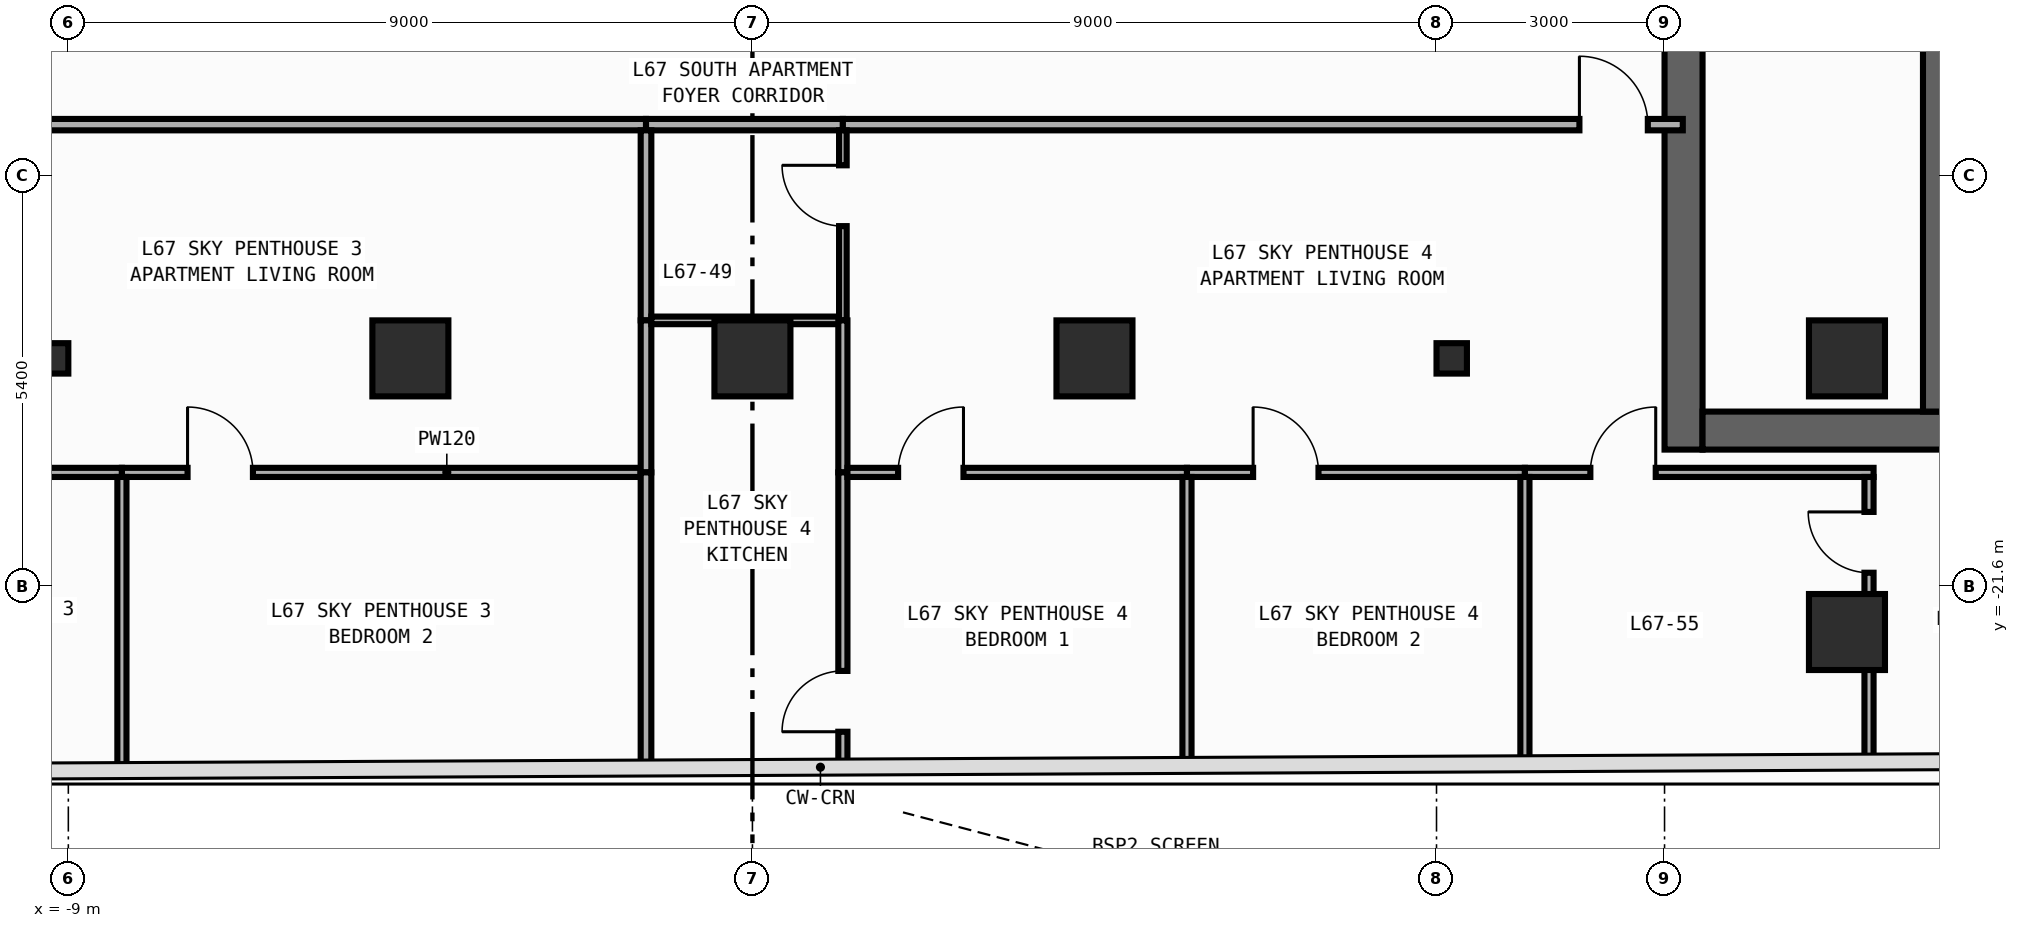
"""IFC4 building model, lengths in metres.
Left out: names, types, materials, properties, quantities, classifications, styles, units other than length and angle.
Written with IfcOpenShell. Run it as: python <this file> out.ifc"""

import sys

from ifc_helpers import new_model, si_unit, direction, frame, frame_2d, origin, origin_2d, place, context, subcontext, project, spatial, rectangle, circle, i_section, extrude, element, fill, save


model = new_model("IFC4")
c1 = context("Model", 3, precision=1e-05, world=origin(), true_north=direction((0.0, 1.0)))
c2 = subcontext(c1, "Body", "Model", "MODEL_VIEW")
j1 = project(units=[si_unit("LENGTHUNIT", "METRE"), si_unit("PLANEANGLEUNIT", "RADIAN")], contexts=[c1])
p1 = place(None, origin())
s1 = spatial("IfcSite", under=j1, at=p1, CompositionType="ELEMENT")
p2 = place(p1, origin())
s2 = spatial("IfcBuilding", under=s1, at=p2, CompositionType="ELEMENT")
p3 = place(p2, frame((0.0, 0.0, 281.4)))
s3 = spatial("IfcBuildingStorey", under=s2, at=p3, CompositionType="ELEMENT", Elevation=281.4)
p4 = place(p3, frame((12.25, -19.8, 0.0), z_axis=(0.0, 0.0, 1.0), x_axis=(0.0, 1.0, 0.0)))
e1 = element("IfcWall", 1, at=p4, inside=s3, PredefinedType="SHEAR", context=c2, shape_type="SweptSolid", body=[
    extrude(rectangle(XDim=27.0, YDim=0.5, at=frame_2d((13.5, 0.0))), origin(), (0.0, 0.0, 1.0), 3.54),
])
p5 = place(p4, frame((23.05, 0.0, 0.0)))
e2 = element("IfcOpeningElement", 2, at=p5, cuts=e1, PredefinedType="OPENING", context=c2, shape_type="SweptSolid", body=[
    extrude(rectangle(XDim=1.1, YDim=2.2, at=frame_2d((0.55, 1.1))), frame((0.0, 0.26, 0.0), z_axis=(0.0, -1.0, 0.0), x_axis=(1.0, 0.0, 0.0)), (0.0, 0.0, 1.0), 0.52),
])
p6 = place(p4, frame((19.85, 0.0, 0.0)))
e3 = element("IfcOpeningElement", 3, at=p6, cuts=e1, PredefinedType="OPENING", context=c2, shape_type="SweptSolid", body=[
    extrude(rectangle(XDim=1.1, YDim=2.2, at=frame_2d((0.55, 1.1))), frame((0.0, 0.26, 0.0), z_axis=(0.0, -1.0, 0.0), x_axis=(1.0, 0.0, 0.0)), (0.0, 0.0, 1.0), 0.52),
])
p7 = place(p4, frame((16.65, 0.0, 0.0)))
e4 = element("IfcOpeningElement", 4, at=p7, cuts=e1, PredefinedType="OPENING", context=c2, shape_type="SweptSolid", body=[
    extrude(rectangle(XDim=1.1, YDim=2.2, at=frame_2d((0.55, 1.1))), frame((0.0, 0.26, 0.0), z_axis=(0.0, -1.0, 0.0), x_axis=(1.0, 0.0, 0.0)), (0.0, 0.0, 1.0), 0.52),
])
p8 = place(p4, frame((10.175, 0.0, 0.0)))
e5 = element("IfcOpeningElement", 5, at=p8, cuts=e1, PredefinedType="OPENING", context=c2, shape_type="SweptSolid", body=[
    extrude(rectangle(XDim=0.85, YDim=2.1, at=frame_2d((0.425, 1.05))), frame((0.0, 0.26, 0.0), z_axis=(0.0, -1.0, 0.0), x_axis=(1.0, 0.0, 0.0)), (0.0, 0.0, 1.0), 0.52),
])
p9 = place(p4, frame((12.725, 0.0, 0.0)))
e6 = element("IfcOpeningElement", 6, at=p9, cuts=e1, PredefinedType="OPENING", context=c2, shape_type="SweptSolid", body=[
    extrude(rectangle(XDim=1.15, YDim=2.2, at=frame_2d((0.575, 1.1))), frame((0.0, 0.26, 0.0), z_axis=(0.0, -1.0, 0.0), x_axis=(1.0, 0.0, 0.0)), (0.0, 0.0, 1.0), 0.52),
])
p10 = place(p4, frame((25.125, 0.0, 0.0)))
e7 = element("IfcOpeningElement", 7, at=p10, cuts=e1, PredefinedType="OPENING", context=c2, shape_type="SweptSolid", body=[
    extrude(rectangle(XDim=0.85, YDim=2.1, at=frame_2d((0.425, 1.05))), frame((0.0, 0.26, 0.0), z_axis=(0.0, -1.0, 0.0), x_axis=(1.0, 0.0, 0.0)), (0.0, 0.0, 1.0), 0.52),
])
p11 = place(p3, frame((12.5, -19.55, 0.0), z_axis=(0.0, 0.0, 1.0), x_axis=(1.0, 0.0, 0.0)))
e8 = element("IfcWall", 8, at=p11, inside=s3, PredefinedType="SHEAR", context=c2, shape_type="SweptSolid", body=[
    extrude(rectangle(XDim=7.4, YDim=0.5, at=frame_2d((3.7, 0.0))), origin(), (0.0, 0.0, 1.0), 3.54),
])
p12 = place(p3, frame((15.55, -19.3, 0.0), z_axis=(0.0, 0.0, 1.0), x_axis=(0.0, 1.0, 0.0)))
e9 = element("IfcWall", 9, at=p12, inside=s3, PredefinedType="SHEAR", context=c2, shape_type="SweptSolid", body=[
    extrude(rectangle(XDim=26.0, YDim=0.3, at=frame_2d((13.0, 0.0))), origin(), (0.0, 0.0, 1.0), 3.54),
])
p13 = place(p12, frame((12.225, 0.0, 0.0)))
e10 = element("IfcOpeningElement", 10, at=p13, cuts=e9, PredefinedType="OPENING", context=c2, shape_type="SweptSolid", body=[
    extrude(rectangle(XDim=1.15, YDim=2.2, at=frame_2d((0.575, 1.1))), frame((0.0, 0.16, 0.0), z_axis=(0.0, -1.0, 0.0), x_axis=(1.0, 0.0, 0.0)), (0.0, 0.0, 1.0), 0.32),
])
p14 = place(p12, frame((24.625, 0.0, 0.0)))
e11 = element("IfcOpeningElement", 11, at=p14, cuts=e9, PredefinedType="OPENING", context=c2, shape_type="SweptSolid", body=[
    extrude(rectangle(XDim=0.85, YDim=2.1, at=frame_2d((0.425, 1.05))), frame((0.0, 0.16, 0.0), z_axis=(0.0, -1.0, 0.0), x_axis=(1.0, 0.0, 0.0)), (0.0, 0.0, 1.0), 0.32),
])
for number, where, z_axis, x_axis in (
    (12, (-9.2, -18.6, 0.0), (0.0, 0.0, 1.0), (1.0, 0.0, 0.0)),
    (13, (9.2, -18.6, 0.0), (0.0, 0.0, 1.0), (1.0, 0.0, 0.0)),
):
    element("IfcColumn", number, at=place(p3, frame(where, z_axis=z_axis, x_axis=x_axis)), inside=s3, PredefinedType="COLUMN", context=c2, shape_type="SweptSolid", body=[
        extrude(i_section(OverallWidth=0.4, OverallDepth=0.4, WebThickness=0.013, FlangeThickness=0.021, FilletRadius=0.022, at=origin_2d()), origin(), (0.0, 0.0, 1.0), 3.8),
    ])
for number, where, z_axis, x_axis in (
    (14, (14.4, -18.6, 0.0), (0.0, 0.0, 1.0), (1.0, 0.0, 0.0)),
    (15, (-4.5, -18.6, 0.0), (0.0, 0.0, 1.0), (1.0, 0.0, 0.0)),
    (16, (0.0, -18.6, 0.0), (0.0, 0.0, 1.0), (1.0, 0.0, 0.0)),
    (17, (4.5, -18.6, 0.0), (0.0, 0.0, 1.0), (1.0, 0.0, 0.0)),
    (18, (14.4, -22.2, 0.0), (0.0, 0.0, 1.0), (1.0, 0.0, 0.0)),
):
    element("IfcColumn", number, at=place(p3, frame(where, z_axis=z_axis, x_axis=x_axis)), inside=s3, PredefinedType="COLUMN", context=c2, shape_type="SweptSolid", body=[
        extrude(circle(Radius=0.5, at=origin_2d()), origin(), (0.0, 0.0, 1.0), 3.8),
    ])
p15 = place(p3, frame((-15.11, -15.525, 0.0), z_axis=(0.0, 0.0, 1.0), x_axis=(1.0, 0.0, 0.0)))
e19 = element("IfcWall", 19, at=p15, inside=s3, PredefinedType="PARTITIONING", context=c2, shape_type="SweptSolid", body=[
    extrude(rectangle(XDim=13.71, YDim=0.15, at=frame_2d((6.855, 0.0))), origin(), (0.0, 0.0, 1.0), 3.54),
])
p16 = place(p15, frame((3.08, 0.0, 0.0)))
e20 = element("IfcOpeningElement", 20, at=p16, cuts=e19, PredefinedType="OPENING", context=c2, shape_type="SweptSolid", body=[
    extrude(rectangle(XDim=0.9, YDim=2.15, at=frame_2d((0.45, 1.075))), frame((0.0, 0.085, 0.0), z_axis=(0.0, -1.0, 0.0), x_axis=(1.0, 0.0, 0.0)), (0.0, 0.0, 1.0), 0.17),
])
p17 = place(p3, frame((-1.4, -15.525, 0.0), z_axis=(0.0, 0.0, 1.0), x_axis=(1.0, 0.0, 0.0)))
e21 = element("IfcWall", 21, at=p17, inside=s3, PredefinedType="PARTITIONING", context=c2, shape_type="SweptSolid", body=[
    extrude(rectangle(XDim=2.59, YDim=0.15, at=frame_2d((1.295, 0.0))), origin(), (0.0, 0.0, 1.0), 3.54),
])
p18 = place(p3, frame((1.19, -15.525, 0.0), z_axis=(0.0, 0.0, 1.0), x_axis=(1.0, 0.0, 0.0)))
e22 = element("IfcWall", 22, at=p18, inside=s3, PredefinedType="PARTITIONING", context=c2, shape_type="SweptSolid", body=[
    extrude(rectangle(XDim=11.05, YDim=0.15, at=frame_2d((5.525, 0.0))), origin(), (0.0, 0.0, 1.0), 3.54),
])
p19 = place(p18, frame((9.69, 0.0, 0.0)))
e23 = element("IfcOpeningElement", 23, at=p19, cuts=e22, PredefinedType="OPENING", context=c2, shape_type="SweptSolid", body=[
    extrude(rectangle(XDim=0.9, YDim=2.15, at=frame_2d((0.45, 1.075))), frame((0.0, 0.085, 0.0), z_axis=(0.0, -1.0, 0.0), x_axis=(1.0, 0.0, 0.0)), (0.0, 0.0, 1.0), 0.17),
])
p20 = place(p3, frame((-15.05, -20.1, 0.0), z_axis=(0.0, 0.0, 1.0), x_axis=(1.0, 0.0, 0.0)))
e24 = element("IfcWall", 24, at=p20, inside=s3, PredefinedType="PARTITIONING", context=c2, shape_type="SweptSolid", body=[
    extrude(rectangle(XDim=6.755, YDim=0.12, at=frame_2d((3.377, 0.0))), origin(), (0.0, 0.0, 1.0), 3.54),
])
p21 = place(p20, frame((2.948, 0.0, 0.0)))
e25 = element("IfcOpeningElement", 25, at=p21, cuts=e24, PredefinedType="OPENING", context=c2, shape_type="SweptSolid", body=[
    extrude(rectangle(XDim=0.86, YDim=2.15, at=frame_2d((0.43, 1.075))), frame((0.0, 0.07, 0.0), z_axis=(0.0, -1.0, 0.0), x_axis=(1.0, 0.0, 0.0)), (0.0, 0.0, 1.0), 0.14),
])
p22 = place(p3, frame((-8.295, -20.1, 0.0), z_axis=(0.0, 0.0, 1.0), x_axis=(1.0, 0.0, 0.0)))
e26 = element("IfcWall", 26, at=p22, inside=s3, PredefinedType="PARTITIONING", context=c2, shape_type="SweptSolid", body=[
    extrude(rectangle(XDim=6.825, YDim=0.12, at=frame_2d((3.413, 0.0))), origin(), (0.0, 0.0, 1.0), 3.54),
])
p23 = place(p22, frame((0.864, 0.0, 0.0)))
e27 = element("IfcOpeningElement", 27, at=p23, cuts=e26, PredefinedType="OPENING", context=c2, shape_type="SweptSolid", body=[
    extrude(rectangle(XDim=0.86, YDim=2.15, at=frame_2d((0.43, 1.075))), frame((0.0, 0.07, 0.0), z_axis=(0.0, -1.0, 0.0), x_axis=(1.0, 0.0, 0.0)), (0.0, 0.0, 1.0), 0.14),
])
p24 = place(p3, frame((-1.4, -18.1, 0.0), z_axis=(0.0, 0.0, 1.0), x_axis=(0.0, 1.0, 0.0)))
e28 = element("IfcWall", 28, at=p24, inside=s3, PredefinedType="PARTITIONING", context=c2, shape_type="SweptSolid", body=[
    extrude(rectangle(XDim=2.5, YDim=0.14, at=frame_2d((1.25, 0.0))), origin(), (0.0, 0.0, 1.0), 3.54),
])
p25 = place(p3, frame((-1.4, -20.1, 0.0), z_axis=(0.0, 0.0, 1.0), x_axis=(0.0, 1.0, 0.0)))
e29 = element("IfcWall", 29, at=p25, inside=s3, PredefinedType="PARTITIONING", context=c2, shape_type="SweptSolid", body=[
    extrude(rectangle(XDim=2.0, YDim=0.14, at=frame_2d((1.0, 0.0))), origin(), (0.0, 0.0, 1.0), 3.54),
])
p26 = place(p3, frame((-8.295, -24.018, 0.0), z_axis=(0.0, 0.0, 1.0), x_axis=(0.0, 1.0, 0.0)))
e30 = element("IfcWall", 30, at=p26, inside=s3, PredefinedType="PARTITIONING", context=c2, shape_type="SweptSolid", body=[
    extrude(rectangle(XDim=3.858, YDim=0.12, at=frame_2d((1.929, 0.0))), origin(), (0.0, 0.0, 1.0), 3.54),
])
p27 = place(p3, frame((-1.4, -23.984, 0.0), z_axis=(0.0, 0.0, 1.0), x_axis=(0.0, 1.0, 0.0)))
e31 = element("IfcWall", 31, at=p27, inside=s3, PredefinedType="PARTITIONING", context=c2, shape_type="SweptSolid", body=[
    extrude(rectangle(XDim=3.884, YDim=0.14, at=frame_2d((1.942, 0.0))), origin(), (0.0, 0.0, 1.0), 3.54),
])
p28 = place(p3, frame((-1.33, -18.1, 0.0), z_axis=(0.0, 0.0, 1.0), x_axis=(1.0, 0.0, 0.0)))
e32 = element("IfcWall", 32, at=p28, inside=s3, PredefinedType="PARTITIONING", context=c2, shape_type="SweptSolid", body=[
    extrude(rectangle(XDim=2.47, YDim=0.1, at=frame_2d((1.235, 0.0))), origin(), (0.0, 0.0, 1.0), 3.54),
])
p29 = place(p3, frame((1.19, -18.1, 0.0), z_axis=(0.0, 0.0, 1.0), x_axis=(0.0, 1.0, 0.0)))
e33 = element("IfcWall", 33, at=p29, inside=s3, PredefinedType="PARTITIONING", context=c2, shape_type="SweptSolid", body=[
    extrude(rectangle(XDim=2.5, YDim=0.1, at=frame_2d((1.25, 0.0))), origin(), (0.0, 0.0, 1.0), 3.54),
])
p30 = place(p29, frame((1.24, 0.0, 0.0)))
e34 = element("IfcOpeningElement", 34, at=p30, cuts=e33, PredefinedType="OPENING", context=c2, shape_type="SweptSolid", body=[
    extrude(rectangle(XDim=0.8, YDim=2.1, at=frame_2d((0.4, 1.05))), frame((0.0, 0.06, 0.0), z_axis=(0.0, -1.0, 0.0), x_axis=(1.0, 0.0, 0.0)), (0.0, 0.0, 1.0), 0.12),
])
p31 = place(p3, frame((1.19, -20.1, 0.0), z_axis=(0.0, 0.0, 1.0), x_axis=(0.0, 1.0, 0.0)))
e35 = element("IfcWall", 35, at=p31, inside=s3, PredefinedType="PARTITIONING", context=c2, shape_type="SweptSolid", body=[
    extrude(rectangle(XDim=2.0, YDim=0.12, at=frame_2d((1.0, 0.0))), origin(), (0.0, 0.0, 1.0), 3.54),
])
p32 = place(p3, frame((1.19, -23.972, 0.0), z_axis=(0.0, 0.0, 1.0), x_axis=(0.0, 1.0, 0.0)))
e36 = element("IfcWall", 36, at=p32, inside=s3, PredefinedType="PARTITIONING", context=c2, shape_type="SweptSolid", body=[
    extrude(rectangle(XDim=3.872, YDim=0.12, at=frame_2d((1.936, 0.0))), origin(), (0.0, 0.0, 1.0), 3.54),
])
p33 = place(p32, frame((0.46, 0.0, 0.0)))
e37 = element("IfcOpeningElement", 37, at=p33, cuts=e36, PredefinedType="OPENING", context=c2, shape_type="SweptSolid", body=[
    extrude(rectangle(XDim=0.8, YDim=2.1, at=frame_2d((0.4, 1.05))), frame((0.0, 0.07, 0.0), z_axis=(0.0, -1.0, 0.0), x_axis=(1.0, 0.0, 0.0)), (0.0, 0.0, 1.0), 0.14),
])
p34 = place(p3, frame((1.25, -20.1, 0.0), z_axis=(0.0, 0.0, 1.0), x_axis=(1.0, 0.0, 0.0)))
e38 = element("IfcWall", 38, at=p34, inside=s3, PredefinedType="PARTITIONING", context=c2, shape_type="SweptSolid", body=[
    extrude(rectangle(XDim=4.467, YDim=0.12, at=frame_2d((2.233, 0.0))), origin(), (0.0, 0.0, 1.0), 3.54),
])
p35 = place(p34, frame((0.667, 0.0, 0.0)))
e39 = element("IfcOpeningElement", 39, at=p35, cuts=e38, PredefinedType="OPENING", context=c2, shape_type="SweptSolid", body=[
    extrude(rectangle(XDim=0.86, YDim=2.15, at=frame_2d((0.43, 1.075))), frame((0.0, 0.07, 0.0), z_axis=(0.0, -1.0, 0.0), x_axis=(1.0, 0.0, 0.0)), (0.0, 0.0, 1.0), 0.14),
])
p36 = place(p3, frame((5.717, -20.1, 0.0), z_axis=(0.0, 0.0, 1.0), x_axis=(1.0, 0.0, 0.0)))
e40 = element("IfcWall", 40, at=p36, inside=s3, PredefinedType="PARTITIONING", context=c2, shape_type="SweptSolid", body=[
    extrude(rectangle(XDim=4.446, YDim=0.12, at=frame_2d((2.223, 0.0))), origin(), (0.0, 0.0, 1.0), 3.54),
])
p37 = place(p36, frame((0.87, 0.0, 0.0)))
e41 = element("IfcOpeningElement", 41, at=p37, cuts=e40, PredefinedType="OPENING", context=c2, shape_type="SweptSolid", body=[
    extrude(rectangle(XDim=0.86, YDim=2.15, at=frame_2d((0.43, 1.075))), frame((0.0, 0.07, 0.0), z_axis=(0.0, -1.0, 0.0), x_axis=(1.0, 0.0, 0.0)), (0.0, 0.0, 1.0), 0.14),
])
p38 = place(p3, frame((10.163, -20.1, 0.0), z_axis=(0.0, 0.0, 1.0), x_axis=(1.0, 0.0, 0.0)))
e42 = element("IfcWall", 42, at=p38, inside=s3, PredefinedType="PARTITIONING", context=c2, shape_type="SweptSolid", body=[
    extrude(rectangle(XDim=4.587, YDim=0.12, at=frame_2d((2.293, 0.0))), origin(), (0.0, 0.0, 1.0), 3.54),
])
p39 = place(p38, frame((0.861, 0.0, 0.0)))
e43 = element("IfcOpeningElement", 43, at=p39, cuts=e42, PredefinedType="OPENING", context=c2, shape_type="SweptSolid", body=[
    extrude(rectangle(XDim=0.86, YDim=2.15, at=frame_2d((0.43, 1.075))), frame((0.0, 0.07, 0.0), z_axis=(0.0, -1.0, 0.0), x_axis=(1.0, 0.0, 0.0)), (0.0, 0.0, 1.0), 0.14),
])
p40 = place(p3, frame((14.69, -23.906, 0.0), z_axis=(0.0, 0.0, 1.0), x_axis=(0.0, 1.0, 0.0)))
e44 = element("IfcWall", 44, at=p40, inside=s3, PredefinedType="PARTITIONING", context=c2, shape_type="SweptSolid", body=[
    extrude(rectangle(XDim=3.747, YDim=0.12, at=frame_2d((1.873, 0.0))), origin(), (0.0, 0.0, 1.0), 2.64),
])
p41 = place(p40, frame((2.486, 0.0, 0.0)))
e45 = element("IfcOpeningElement", 45, at=p41, cuts=e44, PredefinedType="OPENING", context=c2, shape_type="SweptSolid", body=[
    extrude(rectangle(XDim=0.8, YDim=2.1, at=frame_2d((0.4, 1.05))), frame((0.0, 0.07, 0.0), z_axis=(0.0, -1.0, 0.0), x_axis=(1.0, 0.0, 0.0)), (0.0, 0.0, 1.0), 0.14),
])
p42 = place(p3, frame((5.717, -23.95, 0.0), z_axis=(0.0, 0.0, 1.0), x_axis=(0.0, 1.0, 0.0)))
e46 = element("IfcWall", 46, at=p42, inside=s3, PredefinedType="PARTITIONING", context=c2, shape_type="SweptSolid", body=[
    extrude(rectangle(XDim=3.79, YDim=0.12, at=frame_2d((1.895, 0.0))), origin(), (0.0, 0.0, 1.0), 3.54),
])
p43 = place(p3, frame((10.163, -23.928, 0.0), z_axis=(0.0, 0.0, 1.0), x_axis=(0.0, 1.0, 0.0)))
e47 = element("IfcWall", 47, at=p43, inside=s3, PredefinedType="PARTITIONING", context=c2, shape_type="SweptSolid", body=[
    extrude(rectangle(XDim=3.768, YDim=0.12, at=frame_2d((1.884, 0.0))), origin(), (0.0, 0.0, 1.0), 3.54),
])
p44 = place(p19, origin())
e48 = element("IfcDoor", 48, at=p44, inside=s3, OperationType="SINGLE_SWING_LEFT", PredefinedType="DOOR", context=c2, shape_type="SweptSolid", body=[
    extrude(rectangle(XDim=0.9, YDim=2.15, at=frame_2d((0.45, 1.075))), frame((0.0, 0.025, 0.0), z_axis=(0.0, -1.0, 0.0), x_axis=(1.0, 0.0, 0.0)), (0.0, 0.0, 1.0), 0.05),
])
fill(e23, e48)
p45 = place(p23, origin())
e49 = element("IfcDoor", 49, at=p45, inside=s3, OperationType="SINGLE_SWING_LEFT", PredefinedType="DOOR", context=c2, shape_type="SweptSolid", body=[
    extrude(rectangle(XDim=0.86, YDim=2.15, at=frame_2d((0.43, 1.075))), frame((0.0, 0.025, 0.0), z_axis=(0.0, -1.0, 0.0), x_axis=(1.0, 0.0, 0.0)), (0.0, 0.0, 1.0), 0.05),
])
fill(e27, e49)
p46 = place(p30, origin())
e50 = element("IfcDoor", 50, at=p46, inside=s3, OperationType="SINGLE_SWING_RIGHT", PredefinedType="DOOR", context=c2, shape_type="SweptSolid", body=[
    extrude(rectangle(XDim=0.8, YDim=2.1, at=frame_2d((0.4, 1.05))), frame((0.0, 0.025, 0.0), z_axis=(0.0, -1.0, 0.0), x_axis=(1.0, 0.0, 0.0)), (0.0, 0.0, 1.0), 0.05),
])
fill(e34, e50)
p47 = place(p35, origin())
e51 = element("IfcDoor", 51, at=p47, inside=s3, OperationType="SINGLE_SWING_RIGHT", PredefinedType="DOOR", context=c2, shape_type="SweptSolid", body=[
    extrude(rectangle(XDim=0.86, YDim=2.15, at=frame_2d((0.43, 1.075))), frame((0.0, 0.025, 0.0), z_axis=(0.0, -1.0, 0.0), x_axis=(1.0, 0.0, 0.0)), (0.0, 0.0, 1.0), 0.05),
])
fill(e39, e51)
p48 = place(p37, origin())
e52 = element("IfcDoor", 52, at=p48, inside=s3, OperationType="SINGLE_SWING_LEFT", PredefinedType="DOOR", context=c2, shape_type="SweptSolid", body=[
    extrude(rectangle(XDim=0.86, YDim=2.15, at=frame_2d((0.43, 1.075))), frame((0.0, 0.025, 0.0), z_axis=(0.0, -1.0, 0.0), x_axis=(1.0, 0.0, 0.0)), (0.0, 0.0, 1.0), 0.05),
])
fill(e41, e52)
p49 = place(p39, origin())
e53 = element("IfcDoor", 53, at=p49, inside=s3, OperationType="SINGLE_SWING_RIGHT", PredefinedType="DOOR", context=c2, shape_type="SweptSolid", body=[
    extrude(rectangle(XDim=0.86, YDim=2.15, at=frame_2d((0.43, 1.075))), frame((0.0, 0.025, 0.0), z_axis=(0.0, -1.0, 0.0), x_axis=(1.0, 0.0, 0.0)), (0.0, 0.0, 1.0), 0.05),
])
fill(e43, e53)
p50 = place(p33, origin())
e54 = element("IfcDoor", 54, at=p50, inside=s3, OperationType="SINGLE_SWING_LEFT", PredefinedType="DOOR", context=c2, shape_type="SweptSolid", body=[
    extrude(rectangle(XDim=0.8, YDim=2.1, at=frame_2d((0.4, 1.05))), frame((0.0, 0.025, 0.0), z_axis=(0.0, -1.0, 0.0), x_axis=(1.0, 0.0, 0.0)), (0.0, 0.0, 1.0), 0.05),
])
fill(e37, e54)
p51 = place(p41, origin())
e55 = element("IfcDoor", 55, at=p51, inside=s3, OperationType="SINGLE_SWING_RIGHT", PredefinedType="DOOR", context=c2, shape_type="SweptSolid", body=[
    extrude(rectangle(XDim=0.8, YDim=2.1, at=frame_2d((0.4, 1.05))), frame((0.0, 0.025, 0.0), z_axis=(0.0, -1.0, 0.0), x_axis=(1.0, 0.0, 0.0)), (0.0, 0.0, 1.0), 0.05),
])
fill(e45, e55)
save(model, sys.argv[1])
